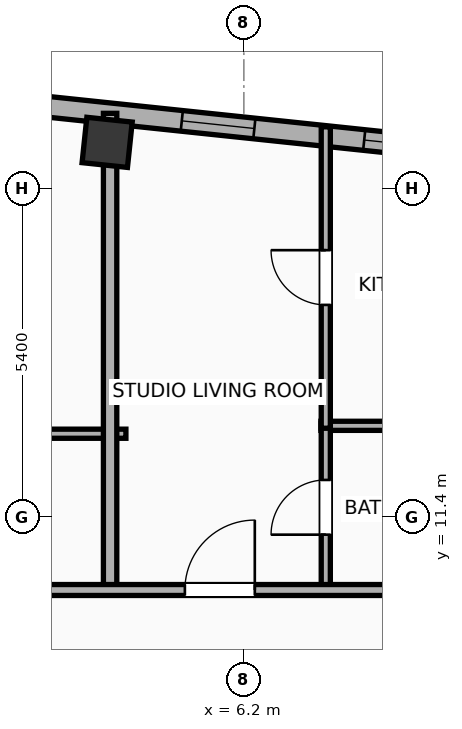
"""IFC4 building model, lengths in metres.
Left out: names, types, materials, properties, quantities, classifications, styles, units other than length and angle.
Written with IfcOpenShell. Run it as: python <this file> out.ifc"""

import sys

from ifc_helpers import new_model, si_unit, direction, frame, frame_2d, origin, origin_2d, place, context, subcontext, project, spatial, rectangle, hollow_rectangle, extrude, element, fill, save


model = new_model("IFC4")
c1 = context("Model", 3, precision=1e-05, world=origin(), true_north=direction((0.0, 1.0)))
c2 = subcontext(c1, "Body", "Model", "MODEL_VIEW")
j1 = project(units=[si_unit("LENGTHUNIT", "METRE"), si_unit("PLANEANGLEUNIT", "RADIAN")], contexts=[c1])
p1 = place(None, origin())
s1 = spatial("IfcSite", under=j1, at=p1, CompositionType="ELEMENT")
p2 = place(p1, origin())
s2 = spatial("IfcBuilding", under=s1, at=p2, CompositionType="ELEMENT")
p3 = place(p2, frame((0.0, 0.0, 295.1)))
s3 = spatial("IfcBuildingStorey", under=s2, at=p3, CompositionType="ELEMENT", Elevation=295.1)
p4 = place(p3, frame((3.952, 17.561, 0.0), z_axis=(0.0, 0.0, 1.0), x_axis=(0.994521895368, -0.104528463268, 0.0)))
e1 = element("IfcColumn", 1, at=p4, inside=s3, PredefinedType="COLUMN", context=c2, shape_type="SweptSolid", body=[
    extrude(hollow_rectangle(XDim=0.75, YDim=0.75, WallThickness=0.025, at=origin_2d()), origin(), (0.0, 0.0, 1.0), 3.9),
])
p5 = place(p3, frame((-23.908, 20.972, 0.0), z_axis=(0.0, 0.0, 1.0), x_axis=(0.994521888554, -0.104528528102, 0.0)))
e2 = element("IfcWall", 2, at=p5, inside=s3, PredefinedType="ELEMENTEDWALL", context=c2, shape_type="SweptSolid", body=[
    extrude(rectangle(XDim=46.766, YDim=0.34, at=frame_2d((23.383, 0.0))), origin(), (0.0, 0.0, 1.0), 3.635),
])
p6 = place(p5, frame((22.933, 0.0, 0.65)))
e3 = element("IfcOpeningElement", 3, at=p6, cuts=e2, PredefinedType="OPENING", context=c2, shape_type="SweptSolid", body=[
    extrude(rectangle(XDim=2.6, YDim=2.45, at=frame_2d((1.3, 1.225))), frame((0.0, 0.18, 0.0), z_axis=(0.0, -1.0, 0.0), x_axis=(1.0, 0.0, 0.0)), (0.0, 0.0, 1.0), 0.36),
])
p7 = place(p5, frame((1.812, 0.0, 0.75)))
e4 = element("IfcOpeningElement", 4, at=p7, cuts=e2, PredefinedType="OPENING", context=c2, shape_type="SweptSolid", body=[
    extrude(rectangle(XDim=1.2, YDim=2.05, at=frame_2d((0.6, 1.025))), frame((0.0, 0.18, 0.0), z_axis=(0.0, -1.0, 0.0), x_axis=(1.0, 0.0, 0.0)), (0.0, 0.0, 1.0), 0.36),
])
p8 = place(p5, frame((7.481, 0.0, 0.75)))
e5 = element("IfcOpeningElement", 5, at=p8, cuts=e2, PredefinedType="OPENING", context=c2, shape_type="SweptSolid", body=[
    extrude(rectangle(XDim=1.2, YDim=2.05, at=frame_2d((0.6, 1.025))), frame((0.0, 0.18, 0.0), z_axis=(0.0, -1.0, 0.0), x_axis=(1.0, 0.0, 0.0)), (0.0, 0.0, 1.0), 0.36),
])
p9 = place(p5, frame((4.464, 0.0, 0.75)))
e6 = element("IfcOpeningElement", 6, at=p9, cuts=e2, PredefinedType="OPENING", context=c2, shape_type="SweptSolid", body=[
    extrude(rectangle(XDim=1.2, YDim=2.05, at=frame_2d((0.6, 1.025))), frame((0.0, 0.18, 0.0), z_axis=(0.0, -1.0, 0.0), x_axis=(1.0, 0.0, 0.0)), (0.0, 0.0, 1.0), 0.36),
])
p10 = place(p5, frame((13.665, 0.0, 0.75)))
e7 = element("IfcOpeningElement", 7, at=p10, cuts=e2, PredefinedType="OPENING", context=c2, shape_type="SweptSolid", body=[
    extrude(rectangle(XDim=1.2, YDim=2.05, at=frame_2d((0.6, 1.025))), frame((0.0, 0.18, 0.0), z_axis=(0.0, -1.0, 0.0), x_axis=(1.0, 0.0, 0.0)), (0.0, 0.0, 1.0), 0.36),
])
p11 = place(p5, frame((10.648, 0.0, 0.75)))
e8 = element("IfcOpeningElement", 8, at=p11, cuts=e2, PredefinedType="OPENING", context=c2, shape_type="SweptSolid", body=[
    extrude(rectangle(XDim=1.2, YDim=2.05, at=frame_2d((0.6, 1.025))), frame((0.0, 0.18, 0.0), z_axis=(0.0, -1.0, 0.0), x_axis=(1.0, 0.0, 0.0)), (0.0, 0.0, 1.0), 0.36),
])
p12 = place(p5, frame((19.254, 0.0, 0.75)))
e9 = element("IfcOpeningElement", 9, at=p12, cuts=e2, PredefinedType="OPENING", context=c2, shape_type="SweptSolid", body=[
    extrude(rectangle(XDim=1.2, YDim=2.05, at=frame_2d((0.6, 1.025))), frame((0.0, 0.18, 0.0), z_axis=(0.0, -1.0, 0.0), x_axis=(1.0, 0.0, 0.0)), (0.0, 0.0, 1.0), 0.36),
])
p13 = place(p5, frame((29.247, 0.0, 0.75)))
e10 = element("IfcOpeningElement", 10, at=p13, cuts=e2, PredefinedType="OPENING", context=c2, shape_type="SweptSolid", body=[
    extrude(rectangle(XDim=1.2, YDim=2.05, at=frame_2d((0.6, 1.025))), frame((0.0, 0.18, 0.0), z_axis=(0.0, -1.0, 0.0), x_axis=(1.0, 0.0, 0.0)), (0.0, 0.0, 1.0), 0.36),
])
p14 = place(p5, frame((32.264, 0.0, 0.75)))
e11 = element("IfcOpeningElement", 11, at=p14, cuts=e2, PredefinedType="OPENING", context=c2, shape_type="SweptSolid", body=[
    extrude(rectangle(XDim=1.2, YDim=2.05, at=frame_2d((0.6, 1.025))), frame((0.0, 0.18, 0.0), z_axis=(0.0, -1.0, 0.0), x_axis=(1.0, 0.0, 0.0)), (0.0, 0.0, 1.0), 0.36),
])
p15 = place(p5, frame((35.553, 0.0, 0.75)))
e12 = element("IfcOpeningElement", 12, at=p15, cuts=e2, PredefinedType="OPENING", context=c2, shape_type="SweptSolid", body=[
    extrude(rectangle(XDim=1.2, YDim=2.05, at=frame_2d((0.6, 1.025))), frame((0.0, 0.18, 0.0), z_axis=(0.0, -1.0, 0.0), x_axis=(1.0, 0.0, 0.0)), (0.0, 0.0, 1.0), 0.36),
])
p16 = place(p5, frame((42.402, 0.0, 0.75)))
e13 = element("IfcOpeningElement", 13, at=p16, cuts=e2, PredefinedType="OPENING", context=c2, shape_type="SweptSolid", body=[
    extrude(rectangle(XDim=1.2, YDim=2.05, at=frame_2d((0.6, 1.025))), frame((0.0, 0.18, 0.0), z_axis=(0.0, -1.0, 0.0), x_axis=(1.0, 0.0, 0.0)), (0.0, 0.0, 1.0), 0.36),
])
p17 = place(p3, frame((1.881, 12.77, 0.0), z_axis=(0.0, 0.0, 1.0), x_axis=(1.0, 0.0, 0.0)))
e14 = element("IfcWall", 14, at=p17, inside=s3, PredefinedType="PLUMBINGWALL", context=c2, shape_type="SweptSolid", body=[
    extrude(rectangle(XDim=2.379, YDim=0.15, at=frame_2d((1.189, 0.0))), origin(), (0.0, 0.0, 1.0), 3.635),
])
p18 = place(p3, frame((4.0, 10.12, 0.0), z_axis=(0.0, 0.0, 1.0), x_axis=(0.0, 1.0, 0.0)))
e15 = element("IfcWall", 15, at=p18, inside=s3, PredefinedType="PARTITIONING", context=c2, shape_type="SweptSolid", body=[
    extrude(rectangle(XDim=7.919, YDim=0.22, at=frame_2d((3.959, 0.0))), origin(), (0.0, 0.0, 1.0), 3.075),
])
p19 = place(p3, frame((7.467, 12.9, 0.0), z_axis=(0.0, 0.0, 1.0), x_axis=(1.0, 0.0, 0.0)))
e16 = element("IfcWall", 16, at=p19, inside=s3, PredefinedType="PLUMBINGWALL", context=c2, shape_type="SweptSolid", body=[
    extrude(rectangle(XDim=2.793, YDim=0.15, at=frame_2d((1.396, 0.0))), origin(), (0.0, 0.0, 1.0), 3.635),
])
p20 = place(p3, frame((7.547, 10.18, 0.0), z_axis=(0.0, 0.0, 1.0), x_axis=(0.0, 1.0, 0.0)))
e17 = element("IfcWall", 17, at=p20, inside=s3, PredefinedType="PLUMBINGWALL", context=c2, shape_type="SweptSolid", body=[
    extrude(rectangle(XDim=2.76, YDim=0.15, at=frame_2d((1.38, 0.0))), origin(), (0.0, 0.0, 1.0), 3.635),
])
p21 = place(p20, frame((0.93, 0.0, 0.0)))
e18 = element("IfcOpeningElement", 18, at=p21, cuts=e17, PredefinedType="OPENING", context=c2, shape_type="SweptSolid", body=[
    extrude(rectangle(XDim=0.9, YDim=2.05, at=frame_2d((0.45, 1.025))), frame((0.0, 0.085, 0.0), z_axis=(0.0, -1.0, 0.0), x_axis=(1.0, 0.0, 0.0)), (0.0, 0.0, 1.0), 0.17),
])
p22 = place(p3, frame((7.547, 12.86, 0.0), z_axis=(0.0, 0.0, 1.0), x_axis=(0.0, 1.0, 0.0)))
e19 = element("IfcWall", 19, at=p22, inside=s3, PredefinedType="PLUMBINGWALL", context=c2, shape_type="SweptSolid", body=[
    extrude(rectangle(XDim=4.957, YDim=0.15, at=frame_2d((2.479, 0.0))), origin(), (0.0, 0.0, 1.0), 3.635),
])
p23 = place(p22, frame((2.029, 0.0, 0.0)))
e20 = element("IfcOpeningElement", 20, at=p23, cuts=e19, PredefinedType="OPENING", context=c2, shape_type="SweptSolid", body=[
    extrude(rectangle(XDim=0.9, YDim=2.05, at=frame_2d((0.45, 1.025))), frame((0.0, 0.085, 0.0), z_axis=(0.0, -1.0, 0.0), x_axis=(1.0, 0.0, 0.0)), (0.0, 0.0, 1.0), 0.17),
])
p24 = place(p3, frame((-28.506, 10.2, 0.0), z_axis=(0.0, 0.0, 1.0), x_axis=(1.0, 0.0, 0.0)))
e21 = element("IfcWall", 21, at=p24, inside=s3, PredefinedType="PARTITIONING", context=c2, shape_type="SweptSolid", body=[
    extrude(rectangle(XDim=53.956, YDim=0.18, at=frame_2d((26.978, 0.0))), origin(), (0.0, 0.0, 1.0), 3.635),
])
p25 = place(p24, frame((3.828, 0.0, 0.0)))
e22 = element("IfcOpeningElement", 22, at=p25, cuts=e21, PredefinedType="OPENING", context=c2, shape_type="SweptSolid", body=[
    extrude(rectangle(XDim=1.15, YDim=2.05, at=frame_2d((0.575, 1.025))), frame((0.0, 0.1, 0.0), z_axis=(0.0, -1.0, 0.0), x_axis=(1.0, 0.0, 0.0)), (0.0, 0.0, 1.0), 0.2),
])
p26 = place(p24, frame((12.029, 0.0, 0.0)))
e23 = element("IfcOpeningElement", 23, at=p26, cuts=e21, PredefinedType="OPENING", context=c2, shape_type="SweptSolid", body=[
    extrude(rectangle(XDim=1.15, YDim=2.05, at=frame_2d((0.575, 1.025))), frame((0.0, 0.1, 0.0), z_axis=(0.0, -1.0, 0.0), x_axis=(1.0, 0.0, 0.0)), (0.0, 0.0, 1.0), 0.2),
])
p27 = place(p24, frame((18.175, 0.0, 0.0)))
e24 = element("IfcOpeningElement", 24, at=p27, cuts=e21, PredefinedType="OPENING", context=c2, shape_type="SweptSolid", body=[
    extrude(rectangle(XDim=1.15, YDim=2.05, at=frame_2d((0.575, 1.025))), frame((0.0, 0.1, 0.0), z_axis=(0.0, -1.0, 0.0), x_axis=(1.0, 0.0, 0.0)), (0.0, 0.0, 1.0), 0.2),
])
p28 = place(p24, frame((23.183, 0.0, 0.0)))
e25 = element("IfcOpeningElement", 25, at=p28, cuts=e21, PredefinedType="OPENING", context=c2, shape_type="SweptSolid", body=[
    extrude(rectangle(XDim=0.9, YDim=2.05, at=frame_2d((0.45, 1.025))), frame((0.0, 0.1, 0.0), z_axis=(0.0, -1.0, 0.0), x_axis=(1.0, 0.0, 0.0)), (0.0, 0.0, 1.0), 0.2),
])
p29 = place(p24, frame((29.182, 0.0, 0.0)))
e26 = element("IfcOpeningElement", 26, at=p29, cuts=e21, PredefinedType="OPENING", context=c2, shape_type="SweptSolid", body=[
    extrude(rectangle(XDim=0.9, YDim=2.05, at=frame_2d((0.45, 1.025))), frame((0.0, 0.1, 0.0), z_axis=(0.0, -1.0, 0.0), x_axis=(1.0, 0.0, 0.0)), (0.0, 0.0, 1.0), 0.2),
])
p30 = place(p24, frame((33.735, 0.0, 0.0)))
e27 = element("IfcOpeningElement", 27, at=p30, cuts=e21, PredefinedType="OPENING", context=c2, shape_type="SweptSolid", body=[
    extrude(rectangle(XDim=1.15, YDim=2.05, at=frame_2d((0.575, 1.025))), frame((0.0, 0.1, 0.0), z_axis=(0.0, -1.0, 0.0), x_axis=(1.0, 0.0, 0.0)), (0.0, 0.0, 1.0), 0.2),
])
p31 = place(p24, frame((41.182, 0.0, 0.0)))
e28 = element("IfcOpeningElement", 28, at=p31, cuts=e21, PredefinedType="OPENING", context=c2, shape_type="SweptSolid", body=[
    extrude(rectangle(XDim=0.9, YDim=2.05, at=frame_2d((0.45, 1.025))), frame((0.0, 0.1, 0.0), z_axis=(0.0, -1.0, 0.0), x_axis=(1.0, 0.0, 0.0)), (0.0, 0.0, 1.0), 0.2),
])
p32 = place(p24, frame((49.114, 0.0, 0.0)))
e29 = element("IfcOpeningElement", 29, at=p32, cuts=e21, PredefinedType="OPENING", context=c2, shape_type="SweptSolid", body=[
    extrude(rectangle(XDim=0.9, YDim=2.05, at=frame_2d((0.45, 1.025))), frame((0.0, 0.1, 0.0), z_axis=(0.0, -1.0, 0.0), x_axis=(1.0, 0.0, 0.0)), (0.0, 0.0, 1.0), 0.2),
])
p33 = place(p13, origin())
e30 = element("IfcWindow", 30, at=p33, inside=s3, PartitioningType="SINGLE_PANEL", PredefinedType="WINDOW", context=c2, shape_type="SweptSolid", body=[
    extrude(rectangle(XDim=1.2, YDim=2.05, at=frame_2d((0.6, 1.025))), frame((0.0, 0.03, 0.0), z_axis=(0.0, -1.0, 0.0), x_axis=(1.0, 0.0, 0.0)), (0.0, 0.0, 1.0), 0.06),
])
fill(e10, e30)
p34 = place(p14, origin())
e31 = element("IfcWindow", 31, at=p34, inside=s3, PartitioningType="SINGLE_PANEL", PredefinedType="WINDOW", context=c2, shape_type="SweptSolid", body=[
    extrude(rectangle(XDim=1.2, YDim=2.05, at=frame_2d((0.6, 1.025))), frame((0.0, 0.03, 0.0), z_axis=(0.0, -1.0, 0.0), x_axis=(1.0, 0.0, 0.0)), (0.0, 0.0, 1.0), 0.06),
])
fill(e11, e31)
p35 = place(p21, origin())
e32 = element("IfcDoor", 32, at=p35, inside=s3, OperationType="SINGLE_SWING_LEFT", PredefinedType="DOOR", context=c2, shape_type="SweptSolid", body=[
    extrude(rectangle(XDim=0.9, YDim=2.05, at=frame_2d((0.45, 1.025))), frame((0.0, 0.025, 0.0), z_axis=(0.0, -1.0, 0.0), x_axis=(1.0, 0.0, 0.0)), (0.0, 0.0, 1.0), 0.05),
])
fill(e18, e32)
p36 = place(p23, origin())
e33 = element("IfcDoor", 33, at=p36, inside=s3, OperationType="SINGLE_SWING_RIGHT", PredefinedType="DOOR", context=c2, shape_type="SweptSolid", body=[
    extrude(rectangle(XDim=0.9, YDim=2.05, at=frame_2d((0.45, 1.025))), frame((0.0, 0.025, 0.0), z_axis=(0.0, -1.0, 0.0), x_axis=(1.0, 0.0, 0.0)), (0.0, 0.0, 1.0), 0.05),
])
fill(e20, e33)
p37 = place(p30, origin())
e34 = element("IfcDoor", 34, at=p37, inside=s3, OperationType="SINGLE_SWING_RIGHT", PredefinedType="DOOR", context=c2, shape_type="SweptSolid", body=[
    extrude(rectangle(XDim=1.15, YDim=2.05, at=frame_2d((0.575, 1.025))), frame((0.0, 0.025, 0.0), z_axis=(0.0, -1.0, 0.0), x_axis=(1.0, 0.0, 0.0)), (0.0, 0.0, 1.0), 0.05),
])
fill(e27, e34)
save(model, sys.argv[1])
